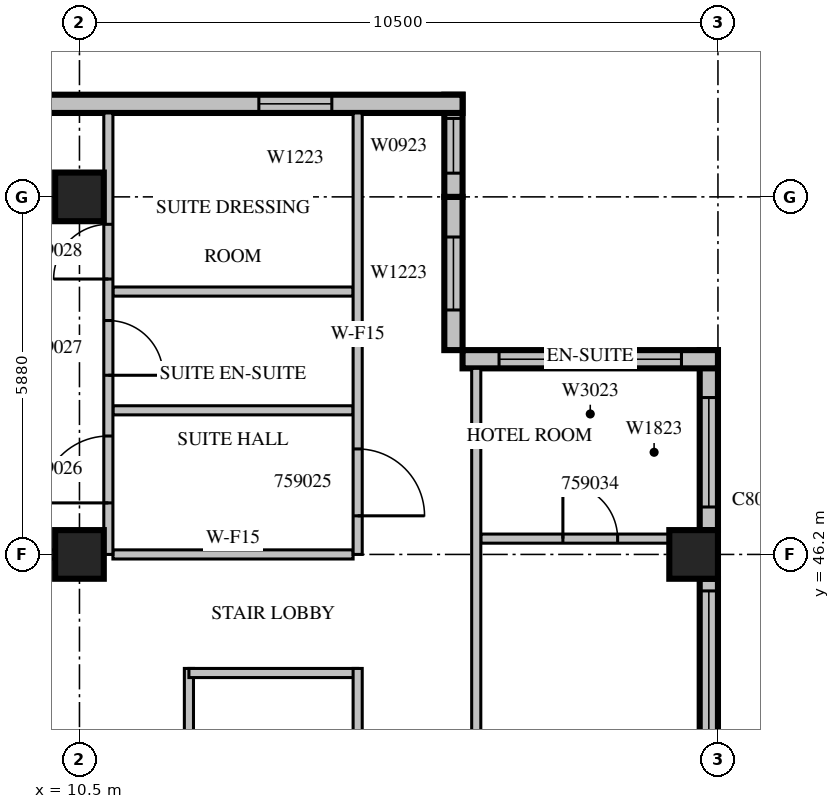
"""IFC4 building model, lengths in metres.
Left out: names, types, materials, properties, quantities, classifications, styles, units other than length and angle.
Written with IfcOpenShell. Run it as: python <this file> out.ifc"""

import sys

from ifc_helpers import new_model, si_unit, direction, frame, frame_2d, origin, origin_2d, place, context, subcontext, project, spatial, rectangle, extrude, source, transform, mapped, element, fill, save


model = new_model("IFC4")
c1 = context("Model", 3, precision=1e-05, world=origin(), true_north=direction((0.0, 1.0)))
c2 = subcontext(c1, "Body", "Model", "MODEL_VIEW")
j1 = project(units=[si_unit("LENGTHUNIT", "METRE"), si_unit("PLANEANGLEUNIT", "RADIAN")], contexts=[c1])
p1 = place(None, origin())
s1 = spatial("IfcSite", under=j1, at=p1, CompositionType="ELEMENT")
p2 = place(p1, origin())
s2 = spatial("IfcBuilding", under=s1, at=p2, CompositionType="ELEMENT")
p3 = place(p2, frame((0.0, 0.0, 257.6)))
s3 = spatial("IfcBuildingStorey", under=s2, at=p3, CompositionType="ELEMENT", Elevation=257.6)
m1 = source(origin(), c2, "Body", "SweptSolid", [
    extrude(rectangle(XDim=0.8, YDim=0.8, at=origin_2d()), origin(), (0.0, 0.0, 1.0), 3.8),
])
for number, where, z_axis, x_axis in (
    (1, (10.5, 46.2, 0.0), (0.0, 0.0, 1.0), (1.0, 0.0, 0.0)),
    (2, (20.6, 46.2, 0.0), (0.0, 0.0, 1.0), (1.0, 0.0, 0.0)),
    (3, (10.5, 52.08, 0.0), (0.0, 0.0, 1.0), (1.0, 0.0, 0.0)),
):
    element("IfcColumn", number, at=place(p3, frame(where, z_axis=z_axis, x_axis=x_axis)), inside=s3, PredefinedType="COLUMN", context=c2, shape_type="MappedRepresentation", body=[
        mapped(m1, transform((0.0, 0.0, 0.0), scale=1.0)),
    ])
m2 = source(origin(), c2, "Body", "SweptSolid", [
    extrude(rectangle(XDim=7.6, YDim=0.3, at=frame_2d((3.8, 0.0))), origin(), (0.0, 0.0, 1.0), 3.4),
])
p4 = place(p3, frame((20.85, 38.2, 0.0), z_axis=(0.0, 0.0, 1.0), x_axis=(0.0, 1.0, 0.0)))
e4 = element("IfcWall", 4, at=p4, inside=s3, PredefinedType="STANDARD", context=c2, shape_type="MappedRepresentation", body=[
    mapped(m2, transform((0.0, 0.0, 0.0), scale=1.0)),
])
m3 = source(origin(), c2, "Body", "SweptSolid", [
    extrude(rectangle(XDim=3.0, YDim=2.3, at=frame_2d((1.5, 1.15))), frame((0.0, 0.16, 0.0), z_axis=(0.0, -1.0, 0.0), x_axis=(1.0, 0.0, 0.0)), (0.0, 0.0, 1.0), 0.32),
])
p5 = place(p4, frame((0.2, 0.0, 0.6)))
e5 = element("IfcOpeningElement", 5, at=p5, cuts=e4, PredefinedType="OPENING", context=c2, shape_type="MappedRepresentation", body=[
    mapped(m3, transform((0.0, 0.0, 0.0), scale=1.0)),
])
p6 = place(p4, frame((4.4, 0.0, 0.6)))
e6 = element("IfcOpeningElement", 6, at=p6, cuts=e4, PredefinedType="OPENING", context=c2, shape_type="MappedRepresentation", body=[
    mapped(m3, transform((0.0, 0.0, 0.0), scale=1.0)),
])
m4 = source(origin(), c2, "Body", "SweptSolid", [
    extrude(rectangle(XDim=2.96, YDim=0.3, at=frame_2d((1.48, 0.0))), origin(), (0.0, 0.0, 1.0), 3.4),
])
p7 = place(p3, frame((20.85, 46.6, 0.0), z_axis=(0.0, 0.0, 1.0), x_axis=(0.0, 1.0, 0.0)))
e7 = element("IfcWall", 7, at=p7, inside=s3, PredefinedType="STANDARD", context=c2, shape_type="MappedRepresentation", body=[
    mapped(m4, transform((0.0, 0.0, 0.0), scale=1.0)),
])
m5 = source(origin(), c2, "Body", "SweptSolid", [
    extrude(rectangle(XDim=1.8, YDim=2.3, at=frame_2d((0.9, 1.15))), frame((0.0, 0.16, 0.0), z_axis=(0.0, -1.0, 0.0), x_axis=(1.0, 0.0, 0.0)), (0.0, 0.0, 1.0), 0.32),
])
p8 = place(p7, frame((0.38, 0.0, 0.6)))
e8 = element("IfcOpeningElement", 8, at=p8, cuts=e7, PredefinedType="OPENING", context=c2, shape_type="MappedRepresentation", body=[
    mapped(m5, transform((0.0, 0.0, 0.0), scale=1.0)),
])
m6 = source(origin(), c2, "Body", "SweptSolid", [
    extrude(rectangle(XDim=4.2, YDim=0.3, at=frame_2d((2.1, 0.0))), origin(), (0.0, 0.0, 1.0), 3.4),
])
p9 = place(p3, frame((21.0, 49.41, 0.0), z_axis=(0.0, 0.0, 1.0), x_axis=(-1.0, 0.0, 0.0)))
e9 = element("IfcWall", 9, at=p9, inside=s3, PredefinedType="STANDARD", context=c2, shape_type="MappedRepresentation", body=[
    mapped(m6, transform((0.0, 0.0, 0.0), scale=1.0)),
])
p10 = place(p9, frame((0.6, 0.0, 0.6)))
e10 = element("IfcOpeningElement", 10, at=p10, cuts=e9, PredefinedType="OPENING", context=c2, shape_type="MappedRepresentation", body=[
    mapped(m3, transform((0.0, 0.0, 0.0), scale=1.0)),
])
m7 = source(origin(), c2, "Body", "SweptSolid", [
    extrude(rectangle(XDim=2.52, YDim=0.3, at=frame_2d((1.26, 0.0))), origin(), (0.0, 0.0, 1.0), 3.4),
])
p11 = place(p3, frame((16.65, 49.56, 0.0), z_axis=(0.0, 0.0, 1.0), x_axis=(0.0, 1.0, 0.0)))
e11 = element("IfcWall", 11, at=p11, inside=s3, PredefinedType="STANDARD", context=c2, shape_type="MappedRepresentation", body=[
    mapped(m7, transform((0.0, 0.0, 0.0), scale=1.0)),
])
m8 = source(origin(), c2, "Body", "SweptSolid", [
    extrude(rectangle(XDim=1.2, YDim=2.3, at=frame_2d((0.6, 1.15))), frame((0.0, 0.16, 0.0), z_axis=(0.0, -1.0, 0.0), x_axis=(1.0, 0.0, 0.0)), (0.0, 0.0, 1.0), 0.32),
])
p12 = place(p11, frame((0.66, 0.0, 0.6)))
e12 = element("IfcOpeningElement", 12, at=p12, cuts=e11, PredefinedType="OPENING", context=c2, shape_type="MappedRepresentation", body=[
    mapped(m8, transform((0.0, 0.0, 0.0), scale=1.0)),
])
m9 = source(origin(), c2, "Body", "SweptSolid", [
    extrude(rectangle(XDim=1.68, YDim=0.3, at=frame_2d((0.84, 0.0))), origin(), (0.0, 0.0, 1.0), 3.4),
])
p13 = place(p3, frame((16.65, 52.08, 0.0), z_axis=(0.0, 0.0, 1.0), x_axis=(0.0, 1.0, 0.0)))
e13 = element("IfcWall", 13, at=p13, inside=s3, PredefinedType="STANDARD", context=c2, shape_type="MappedRepresentation", body=[
    mapped(m9, transform((0.0, 0.0, 0.0), scale=1.0)),
])
m10 = source(origin(), c2, "Body", "SweptSolid", [
    extrude(rectangle(XDim=0.9, YDim=2.3, at=frame_2d((0.45, 1.15))), frame((0.0, 0.16, 0.0), z_axis=(0.0, -1.0, 0.0), x_axis=(1.0, 0.0, 0.0)), (0.0, 0.0, 1.0), 0.32),
])
p14 = place(p13, frame((0.39, 0.0, 0.6)))
e14 = element("IfcOpeningElement", 14, at=p14, cuts=e13, PredefinedType="OPENING", context=c2, shape_type="MappedRepresentation", body=[
    mapped(m10, transform((0.0, 0.0, 0.0), scale=1.0)),
])
m11 = source(origin(), c2, "Body", "SweptSolid", [
    extrude(rectangle(XDim=10.5, YDim=0.3, at=frame_2d((5.25, 0.0))), origin(), (0.0, 0.0, 1.0), 3.4),
])
p15 = place(p3, frame((16.8, 53.61, 0.0), z_axis=(0.0, 0.0, 1.0), x_axis=(-1.0, 0.0, 0.0)))
e15 = element("IfcWall", 15, at=p15, inside=s3, PredefinedType="STANDARD", context=c2, shape_type="MappedRepresentation", body=[
    mapped(m11, transform((0.0, 0.0, 0.0), scale=1.0)),
])
p16 = place(p15, frame((2.15, 0.0, 0.6)))
e16 = element("IfcOpeningElement", 16, at=p16, cuts=e15, PredefinedType="OPENING", context=c2, shape_type="MappedRepresentation", body=[
    mapped(m8, transform((0.0, 0.0, 0.0), scale=1.0)),
])
p17 = place(p15, frame((8.025, 0.0, 0.6)))
e17 = element("IfcOpeningElement", 17, at=p17, cuts=e15, PredefinedType="OPENING", context=c2, shape_type="MappedRepresentation", body=[
    mapped(m5, transform((0.0, 0.0, 0.0), scale=1.0)),
])
m12 = source(origin(), c2, "Body", "SweptSolid", [
    extrude(rectangle(XDim=6.45, YDim=0.15, at=frame_2d((3.225, 0.0))), origin(), (0.0, 0.0, 1.0), 3.4),
])
p18 = place(p3, frame((12.3, 44.325, 0.0), z_axis=(0.0, 0.0, 1.0), x_axis=(0.0, -1.0, 0.0)))
e18 = element("IfcWall", 18, at=p18, inside=s3, PredefinedType="PARTITIONING", context=c2, shape_type="MappedRepresentation", body=[
    mapped(m12, transform((0.0, 0.0, 0.0), scale=1.0)),
])
m13 = source(origin(), c2, "Body", "SweptSolid", [
    extrude(rectangle(XDim=2.775, YDim=0.15, at=frame_2d((1.387, 0.0))), origin(), (0.0, 0.0, 1.0), 3.4),
])
p19 = place(p3, frame((15.075, 44.25, 0.0), z_axis=(0.0, 0.0, 1.0), x_axis=(-1.0, 0.0, 0.0)))
e19 = element("IfcWall", 19, at=p19, inside=s3, PredefinedType="PARTITIONING", context=c2, shape_type="MappedRepresentation", body=[
    mapped(m13, transform((0.0, 0.0, 0.0), scale=1.0)),
])
p20 = place(p3, frame((15.075, 37.875, 0.0), z_axis=(0.0, 0.0, 1.0), x_axis=(0.0, 1.0, 0.0)))
e20 = element("IfcWall", 20, at=p20, inside=s3, PredefinedType="PARTITIONING", context=c2, shape_type="MappedRepresentation", body=[
    mapped(m12, transform((0.0, 0.0, 0.0), scale=1.0)),
])
m14 = source(origin(), c2, "Body", "SweptSolid", [
    extrude(rectangle(XDim=0.9, YDim=2.1, at=frame_2d((0.45, 1.05))), frame((0.0, 0.085, 0.0), z_axis=(0.0, -1.0, 0.0), x_axis=(1.0, 0.0, 0.0)), (0.0, 0.0, 1.0), 0.17),
])
p21 = place(p20, frame((2.737, 0.0, 0.0)))
e21 = element("IfcOpeningElement", 21, at=p21, cuts=e20, PredefinedType="OPENING", context=c2, shape_type="MappedRepresentation", body=[
    mapped(m14, transform((0.0, 0.0, 0.0), scale=1.0)),
])
m15 = source(origin(), c2, "Body", "SweptSolid", [
    extrude(rectangle(XDim=3.95, YDim=0.15, at=frame_2d((1.975, 0.0))), origin(), (0.0, 0.0, 1.0), 3.4),
])
for number, where, z_axis, x_axis in (
    (22, (15.0, 48.57, 0.0), (0.0, 0.0, 1.0), (-1.0, 0.0, 0.0)),
    (23, (15.0, 50.523, 0.0), (0.0, 0.0, 1.0), (-1.0, 0.0, 0.0)),
):
    element("IfcWall", number, at=place(p3, frame(where, z_axis=z_axis, x_axis=x_axis)), inside=s3, PredefinedType="PARTITIONING", context=c2, shape_type="MappedRepresentation", body=[
        mapped(m15, transform((0.0, 0.0, 0.0), scale=1.0)),
    ])
m16 = source(origin(), c2, "Body", "SweptSolid", [
    extrude(rectangle(XDim=3.596, YDim=0.15, at=frame_2d((1.798, 0.0))), origin(), (0.0, 0.0, 1.0), 3.4),
])
p22 = place(p3, frame((10.101, 46.2, 0.0), z_axis=(0.0, 0.0, 1.0), x_axis=(-1.0, 0.0, 0.0)))
e24 = element("IfcWall", 24, at=p22, inside=s3, PredefinedType="PARTITIONING", context=c2, shape_type="MappedRepresentation", body=[
    mapped(m16, transform((0.0, 0.0, 0.0), scale=1.0)),
])
p23 = place(p3, frame((15.0, 46.2, 0.0), z_axis=(0.0, 0.0, 1.0), x_axis=(-1.0, 0.0, 0.0)))
e25 = element("IfcWall", 25, at=p23, inside=s3, PredefinedType="PARTITIONING", context=c2, shape_type="MappedRepresentation", body=[
    mapped(m15, transform((0.0, 0.0, 0.0), scale=1.0)),
])
m17 = source(origin(), c2, "Body", "SweptSolid", [
    extrude(rectangle(XDim=7.26, YDim=0.15, at=frame_2d((3.63, 0.0))), origin(), (0.0, 0.0, 1.0), 3.4),
])
p24 = place(p3, frame((10.975, 46.2, 0.0), z_axis=(0.0, 0.0, 1.0), x_axis=(0.0, 1.0, 0.0)))
e26 = element("IfcWall", 26, at=p24, inside=s3, PredefinedType="PARTITIONING", context=c2, shape_type="MappedRepresentation", body=[
    mapped(m17, transform((0.0, 0.0, 0.0), scale=1.0)),
])
m18 = source(origin(), c2, "Body", "SweptSolid", [
    extrude(rectangle(XDim=1.1, YDim=2.1, at=frame_2d((0.55, 1.05))), frame((0.0, 0.085, 0.0), z_axis=(0.0, -1.0, 0.0), x_axis=(1.0, 0.0, 0.0)), (0.0, 0.0, 1.0), 0.17),
])
p25 = place(p24, frame((0.847, 0.0, 0.0)))
e27 = element("IfcOpeningElement", 27, at=p25, cuts=e26, PredefinedType="OPENING", context=c2, shape_type="MappedRepresentation", body=[
    mapped(m18, transform((0.0, 0.0, 0.0), scale=1.0)),
])
p26 = place(p24, frame((2.946, 0.0, 0.0)))
e28 = element("IfcOpeningElement", 28, at=p26, cuts=e26, PredefinedType="OPENING", context=c2, shape_type="MappedRepresentation", body=[
    mapped(m14, transform((0.0, 0.0, 0.0), scale=1.0)),
])
p27 = place(p24, frame((4.529, 0.0, 0.0)))
e29 = element("IfcOpeningElement", 29, at=p27, cuts=e26, PredefinedType="OPENING", context=c2, shape_type="MappedRepresentation", body=[
    mapped(m14, transform((0.0, 0.0, 0.0), scale=1.0)),
])
m19 = source(origin(), c2, "Body", "SweptSolid", [
    extrude(rectangle(XDim=3.101, YDim=0.15, at=frame_2d((1.55, 0.0))), origin(), (0.0, 0.0, 1.0), 3.4),
])
p28 = place(p3, frame((17.1, 46.46, 0.0), z_axis=(0.0, 0.0, 1.0), x_axis=(1.0, 0.0, 0.0)))
e30 = element("IfcWall", 30, at=p28, inside=s3, PredefinedType="PARTITIONING", context=c2, shape_type="MappedRepresentation", body=[
    mapped(m19, transform((0.0, 0.0, 0.0), scale=1.0)),
])
p29 = place(p28, frame((1.35, 0.0, 0.0)))
e31 = element("IfcOpeningElement", 31, at=p29, cuts=e30, PredefinedType="OPENING", context=c2, shape_type="MappedRepresentation", body=[
    mapped(m14, transform((0.0, 0.0, 0.0), scale=1.0)),
])
p30 = place(p3, frame((15.075, 46.2, 0.0), z_axis=(0.0, 0.0, 1.0), x_axis=(0.0, 1.0, 0.0)))
e32 = element("IfcWall", 32, at=p30, inside=s3, PredefinedType="PARTITIONING", context=c2, shape_type="MappedRepresentation", body=[
    mapped(m17, transform((0.0, 0.0, 0.0), scale=1.0)),
])
p31 = place(p30, frame((0.635, 0.0, 0.0)))
e33 = element("IfcOpeningElement", 33, at=p31, cuts=e32, PredefinedType="OPENING", context=c2, shape_type="MappedRepresentation", body=[
    mapped(m18, transform((0.0, 0.0, 0.0), scale=1.0)),
])
m20 = source(origin(), c2, "Body", "SweptSolid", [
    extrude(rectangle(XDim=19.86, YDim=0.15, at=frame_2d((9.93, 0.0))), origin(), (0.0, 0.0, 1.0), 3.4),
])
p32 = place(p3, frame((17.025, 49.26, 0.0), z_axis=(0.0, 0.0, 1.0), x_axis=(0.0, -1.0, 0.0)))
e34 = element("IfcWall", 34, at=p32, inside=s3, PredefinedType="PARTITIONING", context=c2, shape_type="MappedRepresentation", body=[
    mapped(m20, transform((0.0, 0.0, 0.0), scale=1.0)),
])
p33 = place(p32, frame((18.076, 0.0, 0.0)))
e35 = element("IfcOpeningElement", 35, at=p33, cuts=e34, PredefinedType="OPENING", context=c2, shape_type="MappedRepresentation", body=[
    mapped(m14, transform((0.0, 0.0, 0.0), scale=1.0)),
])
p34 = place(p32, frame((15.976, 0.0, 0.0)))
e36 = element("IfcOpeningElement", 36, at=p34, cuts=e34, PredefinedType="OPENING", context=c2, shape_type="MappedRepresentation", body=[
    mapped(m14, transform((0.0, 0.0, 0.0), scale=1.0)),
])
p35 = place(p32, frame((13.913, 0.0, 0.0)))
e37 = element("IfcOpeningElement", 37, at=p35, cuts=e34, PredefinedType="OPENING", context=c2, shape_type="MappedRepresentation", body=[
    mapped(m14, transform((0.0, 0.0, 0.0), scale=1.0)),
])
p36 = place(p32, frame((11.813, 0.0, 0.0)))
e38 = element("IfcOpeningElement", 38, at=p36, cuts=e34, PredefinedType="OPENING", context=c2, shape_type="MappedRepresentation", body=[
    mapped(m14, transform((0.0, 0.0, 0.0), scale=1.0)),
])
m21 = source(origin(), c2, "Body", "SweptSolid", [
    extrude(rectangle(XDim=1.0, YDim=2.1, at=frame_2d((0.5, 1.05))), frame((0.0, 0.085, 0.0), z_axis=(0.0, -1.0, 0.0), x_axis=(1.0, 0.0, 0.0)), (0.0, 0.0, 1.0), 0.17),
])
p37 = place(p32, frame((6.63, 0.0, 0.0)))
e39 = element("IfcOpeningElement", 39, at=p37, cuts=e34, PredefinedType="OPENING", context=c2, shape_type="MappedRepresentation", body=[
    mapped(m21, transform((0.0, 0.0, 0.0), scale=1.0)),
])
m22 = source(origin(), c2, "Body", "SweptSolid", [
    extrude(rectangle(XDim=3.0, YDim=2.3, at=frame_2d((1.5, 1.15))), frame((0.0, 0.03, 0.0), z_axis=(0.0, -1.0, 0.0), x_axis=(1.0, 0.0, 0.0)), (0.0, 0.0, 1.0), 0.06),
])
p38 = place(p6, origin())
e40 = element("IfcWindow", 40, at=p38, inside=s3, PartitioningType="SINGLE_PANEL", PredefinedType="WINDOW", context=c2, shape_type="MappedRepresentation", body=[
    mapped(m22, transform((0.0, 0.0, 0.0), scale=1.0)),
])
fill(e6, e40)
m23 = source(origin(), c2, "Body", "SweptSolid", [
    extrude(rectangle(XDim=1.8, YDim=2.3, at=frame_2d((0.9, 1.15))), frame((0.0, 0.03, 0.0), z_axis=(0.0, -1.0, 0.0), x_axis=(1.0, 0.0, 0.0)), (0.0, 0.0, 1.0), 0.06),
])
p39 = place(p8, origin())
e41 = element("IfcWindow", 41, at=p39, inside=s3, PartitioningType="SINGLE_PANEL", PredefinedType="WINDOW", context=c2, shape_type="MappedRepresentation", body=[
    mapped(m23, transform((0.0, 0.0, 0.0), scale=1.0)),
])
fill(e8, e41)
p40 = place(p10, origin())
e42 = element("IfcWindow", 42, at=p40, inside=s3, PartitioningType="SINGLE_PANEL", PredefinedType="WINDOW", context=c2, shape_type="MappedRepresentation", body=[
    mapped(m22, transform((0.0, 0.0, 0.0), scale=1.0)),
])
fill(e10, e42)
m24 = source(origin(), c2, "Body", "SweptSolid", [
    extrude(rectangle(XDim=1.2, YDim=2.3, at=frame_2d((0.6, 1.15))), frame((0.0, 0.03, 0.0), z_axis=(0.0, -1.0, 0.0), x_axis=(1.0, 0.0, 0.0)), (0.0, 0.0, 1.0), 0.06),
])
p41 = place(p12, origin())
e43 = element("IfcWindow", 43, at=p41, inside=s3, PartitioningType="SINGLE_PANEL", PredefinedType="WINDOW", context=c2, shape_type="MappedRepresentation", body=[
    mapped(m24, transform((0.0, 0.0, 0.0), scale=1.0)),
])
fill(e12, e43)
m25 = source(origin(), c2, "Body", "SweptSolid", [
    extrude(rectangle(XDim=0.9, YDim=2.3, at=frame_2d((0.45, 1.15))), frame((0.0, 0.03, 0.0), z_axis=(0.0, -1.0, 0.0), x_axis=(1.0, 0.0, 0.0)), (0.0, 0.0, 1.0), 0.06),
])
p42 = place(p14, origin())
e44 = element("IfcWindow", 44, at=p42, inside=s3, PartitioningType="SINGLE_PANEL", PredefinedType="WINDOW", context=c2, shape_type="MappedRepresentation", body=[
    mapped(m25, transform((0.0, 0.0, 0.0), scale=1.0)),
])
fill(e14, e44)
p43 = place(p16, origin())
e45 = element("IfcWindow", 45, at=p43, inside=s3, PartitioningType="SINGLE_PANEL", PredefinedType="WINDOW", context=c2, shape_type="MappedRepresentation", body=[
    mapped(m24, transform((0.0, 0.0, 0.0), scale=1.0)),
])
fill(e16, e45)
m26 = source(origin(), c2, "Body", "SweptSolid", [
    extrude(rectangle(XDim=1.1, YDim=2.1, at=frame_2d((0.55, 1.05))), frame((0.0, 0.025, 0.0), z_axis=(0.0, -1.0, 0.0), x_axis=(1.0, 0.0, 0.0)), (0.0, 0.0, 1.0), 0.05),
])
p44 = place(p31, origin())
e46 = element("IfcDoor", 46, at=p44, inside=s3, OperationType="SINGLE_SWING_RIGHT", PredefinedType="DOOR", context=c2, shape_type="MappedRepresentation", body=[
    mapped(m26, transform((0.0, 0.0, 0.0), scale=1.0)),
])
fill(e33, e46)
p45 = place(p25, origin())
e47 = element("IfcDoor", 47, at=p45, inside=s3, OperationType="SINGLE_SWING_LEFT", PredefinedType="DOOR", context=c2, shape_type="MappedRepresentation", body=[
    mapped(m26, transform((0.0, 0.0, 0.0), scale=1.0)),
])
fill(e27, e47)
m27 = source(origin(), c2, "Body", "SweptSolid", [
    extrude(rectangle(XDim=0.9, YDim=2.1, at=frame_2d((0.45, 1.05))), frame((0.0, 0.025, 0.0), z_axis=(0.0, -1.0, 0.0), x_axis=(1.0, 0.0, 0.0)), (0.0, 0.0, 1.0), 0.05),
])
p46 = place(p26, origin())
e48 = element("IfcDoor", 48, at=p46, inside=s3, OperationType="SINGLE_SWING_RIGHT", PredefinedType="DOOR", context=c2, shape_type="MappedRepresentation", body=[
    mapped(m27, transform((0.0, 0.0, 0.0), scale=1.0)),
])
fill(e28, e48)
p47 = place(p27, origin())
e49 = element("IfcDoor", 49, at=p47, inside=s3, OperationType="SINGLE_SWING_LEFT", PredefinedType="DOOR", context=c2, shape_type="MappedRepresentation", body=[
    mapped(m27, transform((0.0, 0.0, 0.0), scale=1.0)),
])
fill(e29, e49)
p48 = place(p29, origin())
e50 = element("IfcDoor", 50, at=p48, inside=s3, OperationType="SINGLE_SWING_LEFT", PredefinedType="DOOR", context=c2, shape_type="MappedRepresentation", body=[
    mapped(m27, transform((0.0, 0.0, 0.0), scale=1.0)),
])
fill(e31, e50)
save(model, sys.argv[1])
